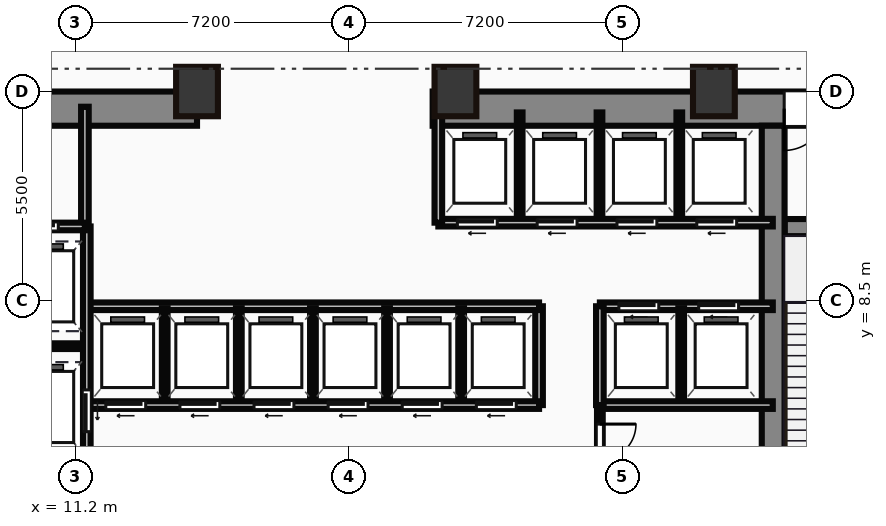
"""IFC4 building model, lengths in metres.
Left out: names, types, materials, properties, quantities, classifications, styles, units other than length and angle.
Written with IfcOpenShell. Run it as: python <this file> out.ifc"""

import sys

from ifc_helpers import new_model, si_unit, direction, frame, frame_2d, origin, origin_2d, place, context, subcontext, project, spatial, rectangle, hollow_rectangle, extrude, source, transform, mapped, element, fill, save


model = new_model("IFC4")
c1 = context("Model", 3, precision=1e-05, world=origin(), true_north=direction((0.0, 1.0)))
c2 = subcontext(c1, "Body", "Model", "MODEL_VIEW")
j1 = project(units=[si_unit("LENGTHUNIT", "METRE"), si_unit("PLANEANGLEUNIT", "RADIAN")], contexts=[c1])
p1 = place(None, origin())
s1 = spatial("IfcSite", under=j1, at=p1, CompositionType="ELEMENT")
p2 = place(p1, origin())
s2 = spatial("IfcBuilding", under=s1, at=p2, CompositionType="ELEMENT")
p3 = place(p2, origin())
s3 = spatial("IfcBuildingStorey", under=s2, at=p3, CompositionType="ELEMENT", Elevation=0.0)
m1 = source(origin(), c2, "Body", "SweptSolid", [
    extrude(rectangle(XDim=9.1, YDim=0.9, at=frame_2d((4.55, 0.0))), origin(), (0.0, 0.0, 1.0), 6.0),
])
p4 = place(p3, frame((5.3, 13.55, 0.0), z_axis=(0.0, 0.0, 1.0), x_axis=(1.0, 0.0, 0.0)))
e1 = element("IfcWall", 1, at=p4, inside=s3, PredefinedType="SHEAR", context=c2, shape_type="MappedRepresentation", body=[
    mapped(m1, transform((0.0, 0.0, 0.0))),
])
p5 = place(p4, frame((4.1, 0.0, 0.0)))
e2 = element("IfcOpeningElement", 2, at=p5, cuts=e1, PredefinedType="OPENING", context=c2, shape_type="SweptSolid", body=[
    extrude(rectangle(XDim=1.1, YDim=2.15, at=frame_2d((0.55, 1.075))), frame((0.0, 0.46, 0.0), z_axis=(0.0, -1.0, 0.0), x_axis=(1.0, 0.0, 0.0)), (0.0, 0.0, 1.0), 0.92),
])
m2 = source(origin(), c2, "Body", "SweptSolid", [
    extrude(rectangle(XDim=12.6, YDim=0.9, at=frame_2d((6.3, 0.0))), origin(), (0.0, 0.0, 1.0), 6.0),
])
p6 = place(p3, frame((20.6, 13.55, 0.0), z_axis=(0.0, 0.0, 1.0), x_axis=(1.0, 0.0, 0.0)))
e3 = element("IfcWall", 3, at=p6, inside=s3, PredefinedType="SHEAR", context=c2, shape_type="MappedRepresentation", body=[
    mapped(m2, transform((0.0, 0.0, 0.0))),
])
p7 = place(p6, frame((9.25, 0.0, 0.0)))
e4 = element("IfcOpeningElement", 4, at=p7, cuts=e3, PredefinedType="OPENING", context=c2, shape_type="SweptSolid", body=[
    extrude(rectangle(XDim=1.1, YDim=2.15, at=frame_2d((0.55, 1.075))), frame((0.0, 0.46, 0.0), z_axis=(0.0, -1.0, 0.0), x_axis=(1.0, 0.0, 0.0)), (0.0, 0.0, 1.0), 0.92),
])
m3 = source(origin(), c2, "Body", "SweptSolid", [
    extrude(rectangle(XDim=12.2, YDim=0.6, at=frame_2d((6.1, 0.0))), origin(), (0.0, 0.0, 1.0), 6.0),
])
p8 = place(p3, frame((29.56, 0.9, 0.0), z_axis=(0.0, 0.0, 1.0), x_axis=(0.0, 1.0, 0.0)))
e5 = element("IfcWall", 5, at=p8, inside=s3, PredefinedType="SHEAR", context=c2, shape_type="MappedRepresentation", body=[
    mapped(m3, transform((0.0, 0.0, 0.0))),
])
m4 = source(origin(), c2, "Body", "SweptSolid", [
    extrude(rectangle(XDim=3.39, YDim=0.45, at=frame_2d((1.695, 0.0))), origin(), (0.0, 0.0, 1.0), 6.0),
])
p9 = place(p3, frame((29.86, 10.42, 0.0), z_axis=(0.0, 0.0, 1.0), x_axis=(1.0, 0.0, 0.0)))
e6 = element("IfcWall", 6, at=p9, inside=s3, PredefinedType="SHEAR", context=c2, shape_type="MappedRepresentation", body=[
    mapped(m4, transform((0.0, 0.0, 0.0))),
])
p10 = place(p9, frame((1.1, 0.0, 0.0)))
e7 = element("IfcOpeningElement", 7, at=p10, cuts=e6, PredefinedType="OPENING", context=c2, shape_type="SweptSolid", body=[
    extrude(rectangle(XDim=1.1, YDim=2.15, at=frame_2d((0.55, 1.075))), frame((0.0, 0.235, 0.0), z_axis=(0.0, -1.0, 0.0), x_axis=(1.0, 0.0, 0.0)), (0.0, 0.0, 1.0), 0.47),
])
m5 = source(origin(), c2, "Body", "SweptSolid", [
    extrude(hollow_rectangle(XDim=1.1, YDim=1.3, WallThickness=0.055, at=origin_2d()), origin(), (0.0, 0.0, 1.0), 6.0),
])
for number, where, z_axis, x_axis in (
    (8, (14.4, 14.0, 0.0), (0.0, 0.0, 1.0), (1.0, 0.0, 0.0)),
    (9, (21.2, 14.0, 0.0), (0.0, 0.0, 1.0), (1.0, 0.0, 0.0)),
    (10, (28.0, 14.0, 0.0), (0.0, 0.0, 1.0), (1.0, 0.0, 0.0)),
):
    element("IfcColumn", number, at=place(p3, frame(where, z_axis=z_axis, x_axis=x_axis)), inside=s3, PredefinedType="PILASTER", context=c2, shape_type="MappedRepresentation", body=[
        mapped(m5, transform((0.0, 0.0, 0.0))),
    ])
m6 = source(origin(), c2, "Body", "SweptSolid", [
    extrude(rectangle(XDim=3.18, YDim=0.2, at=frame_2d((1.59, 0.0))), origin(), (0.0, 0.0, 1.0), 5.7),
])
p11 = place(p3, frame((11.45, 10.42, 0.0), z_axis=(0.0, 0.0, 1.0), x_axis=(0.0, 1.0, 0.0)))
e11 = element("IfcWall", 11, at=p11, inside=s3, PredefinedType="PARTITIONING", context=c2, shape_type="MappedRepresentation", body=[
    mapped(m6, transform((0.0, 0.0, 0.0))),
])
m7 = source(origin(), c2, "Body", "SweptSolid", [
    extrude(rectangle(XDim=2.35, YDim=0.2, at=frame_2d((1.175, 0.0))), origin(), (0.0, 0.0, 1.0), 5.7),
])
p12 = place(p3, frame((9.1, 10.45, 0.0), z_axis=(0.0, 0.0, 1.0), x_axis=(1.0, 0.0, 0.0)))
e12 = element("IfcWall", 12, at=p12, inside=s3, PredefinedType="PARTITIONING", context=c2, shape_type="MappedRepresentation", body=[
    mapped(m7, transform((0.0, 0.0, 0.0))),
])
p13 = place(p12, frame((0.55, 0.0, 0.0)))
e13 = element("IfcOpeningElement", 13, at=p13, cuts=e12, PredefinedType="OPENING", context=c2, shape_type="SweptSolid", body=[
    extrude(rectangle(XDim=1.1, YDim=2.15, at=frame_2d((0.55, 1.075))), frame((0.0, 0.11, 0.0), z_axis=(0.0, -1.0, 0.0), x_axis=(1.0, 0.0, 0.0)), (0.0, 0.0, 1.0), 0.22),
])
m8 = source(origin(), c2, "Body", "SweptSolid", [
    extrude(rectangle(XDim=9.6, YDim=0.2, at=frame_2d((4.8, 0.0))), origin(), (0.0, 0.0, 1.0), 5.7),
])
p14 = place(p3, frame((11.5, 0.85, 0.0), z_axis=(0.0, 0.0, 1.0), x_axis=(0.0, 1.0, 0.0)))
e14 = element("IfcWall", 14, at=p14, inside=s3, PredefinedType="PARTITIONING", context=c2, shape_type="MappedRepresentation", body=[
    mapped(m8, transform((0.0, 0.0, 0.0))),
])
p15 = place(p14, frame((4.2, 0.0, 0.0)))
e15 = element("IfcOpeningElement", 15, at=p15, cuts=e14, PredefinedType="OPENING", context=c2, shape_type="SweptSolid", body=[
    extrude(rectangle(XDim=1.1, YDim=2.15, at=frame_2d((0.55, 1.075))), frame((0.0, 0.11, 0.0), z_axis=(0.0, -1.0, 0.0), x_axis=(1.0, 0.0, 0.0)), (0.0, 0.0, 1.0), 0.22),
])
p16 = place(p14, frame((0.9, 0.0, 0.0)))
e16 = element("IfcOpeningElement", 16, at=p16, cuts=e14, PredefinedType="OPENING", context=c2, shape_type="SweptSolid", body=[
    extrude(rectangle(XDim=1.2, YDim=2.15, at=frame_2d((0.6, 1.075))), frame((0.0, 0.11, 0.0), z_axis=(0.0, -1.0, 0.0), x_axis=(1.0, 0.0, 0.0)), (0.0, 0.0, 1.0), 0.22),
])
m9 = source(origin(), c2, "Body", "SweptSolid", [
    extrude(rectangle(XDim=2.4, YDim=0.15, at=frame_2d((1.2, 0.0))), origin(), (0.0, 0.0, 1.0), 5.7),
])
p17 = place(p3, frame((9.1, 7.3, 0.0), z_axis=(0.0, 0.0, 1.0), x_axis=(1.0, 0.0, 0.0)))
e17 = element("IfcWall", 17, at=p17, inside=s3, PredefinedType="PARTITIONING", context=c2, shape_type="MappedRepresentation", body=[
    mapped(m9, transform((0.0, 0.0, 0.0))),
])
m10 = source(origin(), c2, "Body", "SweptSolid", [
    extrude(rectangle(XDim=11.85, YDim=0.2, at=frame_2d((5.925, 0.0))), origin(), (0.0, 0.0, 1.0), 5.7),
])
p18 = place(p3, frame((11.55, 5.75, 0.0), z_axis=(0.0, 0.0, 1.0), x_axis=(1.0, 0.0, 0.0)))
e18 = element("IfcWall", 18, at=p18, inside=s3, PredefinedType="PARTITIONING", context=c2, shape_type="MappedRepresentation", body=[
    mapped(m10, transform((0.0, 0.0, 0.0))),
])
p19 = place(p18, frame((0.45, 0.0, 0.0)))
e19 = element("IfcOpeningElement", 19, at=p19, cuts=e18, PredefinedType="OPENING", context=c2, shape_type="SweptSolid", body=[
    extrude(rectangle(XDim=1.05, YDim=2.15, at=frame_2d((0.525, 1.075))), frame((0.0, 0.11, 0.0), z_axis=(0.0, -1.0, 0.0), x_axis=(1.0, 0.0, 0.0)), (0.0, 0.0, 1.0), 0.22),
])
p20 = place(p18, frame((2.4, 0.0, 0.0)))
e20 = element("IfcOpeningElement", 20, at=p20, cuts=e18, PredefinedType="OPENING", context=c2, shape_type="SweptSolid", body=[
    extrude(rectangle(XDim=1.05, YDim=2.15, at=frame_2d((0.525, 1.075))), frame((0.0, 0.11, 0.0), z_axis=(0.0, -1.0, 0.0), x_axis=(1.0, 0.0, 0.0)), (0.0, 0.0, 1.0), 0.22),
])
p21 = place(p18, frame((4.35, 0.0, 0.0)))
e21 = element("IfcOpeningElement", 21, at=p21, cuts=e18, PredefinedType="OPENING", context=c2, shape_type="SweptSolid", body=[
    extrude(rectangle(XDim=1.05, YDim=2.15, at=frame_2d((0.525, 1.075))), frame((0.0, 0.11, 0.0), z_axis=(0.0, -1.0, 0.0), x_axis=(1.0, 0.0, 0.0)), (0.0, 0.0, 1.0), 0.22),
])
p22 = place(p18, frame((6.3, 0.0, 0.0)))
e22 = element("IfcOpeningElement", 22, at=p22, cuts=e18, PredefinedType="OPENING", context=c2, shape_type="SweptSolid", body=[
    extrude(rectangle(XDim=1.05, YDim=2.15, at=frame_2d((0.525, 1.075))), frame((0.0, 0.11, 0.0), z_axis=(0.0, -1.0, 0.0), x_axis=(1.0, 0.0, 0.0)), (0.0, 0.0, 1.0), 0.22),
])
p23 = place(p18, frame((8.25, 0.0, 0.0)))
e23 = element("IfcOpeningElement", 23, at=p23, cuts=e18, PredefinedType="OPENING", context=c2, shape_type="SweptSolid", body=[
    extrude(rectangle(XDim=1.05, YDim=2.15, at=frame_2d((0.525, 1.075))), frame((0.0, 0.11, 0.0), z_axis=(0.0, -1.0, 0.0), x_axis=(1.0, 0.0, 0.0)), (0.0, 0.0, 1.0), 0.22),
])
p24 = place(p18, frame((10.2, 0.0, 0.0)))
e24 = element("IfcOpeningElement", 24, at=p24, cuts=e18, PredefinedType="OPENING", context=c2, shape_type="SweptSolid", body=[
    extrude(rectangle(XDim=1.05, YDim=2.15, at=frame_2d((0.525, 1.075))), frame((0.0, 0.11, 0.0), z_axis=(0.0, -1.0, 0.0), x_axis=(1.0, 0.0, 0.0)), (0.0, 0.0, 1.0), 0.22),
])
p25 = place(p3, frame((11.55, 8.35, 0.0), z_axis=(0.0, 0.0, 1.0), x_axis=(1.0, 0.0, 0.0)))
e25 = element("IfcWall", 25, at=p25, inside=s3, PredefinedType="PARTITIONING", context=c2, shape_type="MappedRepresentation", body=[
    mapped(m10, transform((0.0, 0.0, 0.0))),
])
m11 = source(origin(), c2, "Body", "SweptSolid", [
    extrude(rectangle(XDim=2.6, YDim=0.2, at=frame_2d((1.3, 0.0))), origin(), (0.0, 0.0, 1.0), 5.7),
])
p26 = place(p3, frame((23.4, 5.75, 0.0), z_axis=(0.0, 0.0, 1.0), x_axis=(0.0, 1.0, 0.0)))
e26 = element("IfcWall", 26, at=p26, inside=s3, PredefinedType="PARTITIONING", context=c2, shape_type="MappedRepresentation", body=[
    mapped(m11, transform((0.0, 0.0, 0.0))),
])
m12 = source(origin(), c2, "Body", "SweptSolid", [
    extrude(rectangle(XDim=2.5, YDim=0.15, at=frame_2d((1.25, 0.0))), origin(), (0.0, 0.0, 1.0), 5.7),
])
for number, where, z_axis, x_axis in (
    (27, (13.55, 5.8, 0.0), (0.0, 0.0, 1.0), (0.0, 1.0, 0.0)),
    (28, (15.5, 5.8, 0.0), (0.0, 0.0, 1.0), (0.0, 1.0, 0.0)),
    (29, (17.45, 5.8, 0.0), (0.0, 0.0, 1.0), (0.0, 1.0, 0.0)),
    (30, (19.4, 5.8, 0.0), (0.0, 0.0, 1.0), (0.0, 1.0, 0.0)),
    (31, (21.35, 5.8, 0.0), (0.0, 0.0, 1.0), (0.0, 1.0, 0.0)),
):
    element("IfcWall", number, at=place(p3, frame(where, z_axis=z_axis, x_axis=x_axis)), inside=s3, PredefinedType="PARTITIONING", context=c2, shape_type="MappedRepresentation", body=[
        mapped(m12, transform((0.0, 0.0, 0.0))),
    ])
m13 = source(origin(), c2, "Body", "SweptSolid", [
    extrude(rectangle(XDim=8.8, YDim=0.2, at=frame_2d((4.4, 0.0))), origin(), (0.0, 0.0, 1.0), 5.7),
])
p27 = place(p3, frame((20.75, 10.55, 0.0), z_axis=(0.0, 0.0, 1.0), x_axis=(1.0, 0.0, 0.0)))
e32 = element("IfcWall", 32, at=p27, inside=s3, PredefinedType="PARTITIONING", context=c2, shape_type="MappedRepresentation", body=[
    mapped(m13, transform((0.0, 0.0, 0.0))),
])
p28 = place(p27, frame((0.5, 0.0, 0.0)))
e33 = element("IfcOpeningElement", 33, at=p28, cuts=e32, PredefinedType="OPENING", context=c2, shape_type="SweptSolid", body=[
    extrude(rectangle(XDim=1.05, YDim=2.15, at=frame_2d((0.525, 1.075))), frame((0.0, 0.11, 0.0), z_axis=(0.0, -1.0, 0.0), x_axis=(1.0, 0.0, 0.0)), (0.0, 0.0, 1.0), 0.22),
])
p29 = place(p27, frame((2.6, 0.0, 0.0)))
e34 = element("IfcOpeningElement", 34, at=p29, cuts=e32, PredefinedType="OPENING", context=c2, shape_type="SweptSolid", body=[
    extrude(rectangle(XDim=1.05, YDim=2.15, at=frame_2d((0.525, 1.075))), frame((0.0, 0.11, 0.0), z_axis=(0.0, -1.0, 0.0), x_axis=(1.0, 0.0, 0.0)), (0.0, 0.0, 1.0), 0.22),
])
p30 = place(p27, frame((4.7, 0.0, 0.0)))
e35 = element("IfcOpeningElement", 35, at=p30, cuts=e32, PredefinedType="OPENING", context=c2, shape_type="SweptSolid", body=[
    extrude(rectangle(XDim=1.05, YDim=2.15, at=frame_2d((0.525, 1.075))), frame((0.0, 0.11, 0.0), z_axis=(0.0, -1.0, 0.0), x_axis=(1.0, 0.0, 0.0)), (0.0, 0.0, 1.0), 0.22),
])
p31 = place(p27, frame((6.8, 0.0, 0.0)))
e36 = element("IfcOpeningElement", 36, at=p31, cuts=e32, PredefinedType="OPENING", context=c2, shape_type="SweptSolid", body=[
    extrude(rectangle(XDim=1.05, YDim=2.15, at=frame_2d((0.525, 1.075))), frame((0.0, 0.11, 0.0), z_axis=(0.0, -1.0, 0.0), x_axis=(1.0, 0.0, 0.0)), (0.0, 0.0, 1.0), 0.22),
])
m14 = source(origin(), c2, "Body", "SweptSolid", [
    extrude(rectangle(XDim=3.0, YDim=0.2, at=frame_2d((1.5, 0.0))), origin(), (0.0, 0.0, 1.0), 5.7),
])
p32 = place(p3, frame((20.75, 10.55, 0.0), z_axis=(0.0, 0.0, 1.0), x_axis=(0.0, 1.0, 0.0)))
e37 = element("IfcWall", 37, at=p32, inside=s3, PredefinedType="PARTITIONING", context=c2, shape_type="MappedRepresentation", body=[
    mapped(m14, transform((0.0, 0.0, 0.0))),
])
m15 = source(origin(), c2, "Body", "SweptSolid", [
    extrude(rectangle(XDim=2.85, YDim=0.15, at=frame_2d((1.425, 0.0))), origin(), (0.0, 0.0, 1.0), 5.7),
])
for number, where, z_axis, x_axis in (
    (38, (22.89, 10.6, 0.0), (0.0, 0.0, 1.0), (0.0, 1.0, 0.0)),
    (39, (24.99, 10.6, 0.0), (0.0, 0.0, 1.0), (0.0, 1.0, 0.0)),
    (40, (27.09, 10.6, 0.0), (0.0, 0.0, 1.0), (0.0, 1.0, 0.0)),
):
    element("IfcWall", number, at=place(p3, frame(where, z_axis=z_axis, x_axis=x_axis)), inside=s3, PredefinedType="PARTITIONING", context=c2, shape_type="MappedRepresentation", body=[
        mapped(m15, transform((0.0, 0.0, 0.0))),
    ])
m16 = source(origin(), c2, "Body", "SweptSolid", [
    extrude(rectangle(XDim=4.55, YDim=0.2, at=frame_2d((2.275, 0.0))), origin(), (0.0, 0.0, 1.0), 5.7),
])
p33 = place(p3, frame((25.0, 8.35, 0.0), z_axis=(0.0, 0.0, 1.0), x_axis=(1.0, 0.0, 0.0)))
e41 = element("IfcWall", 41, at=p33, inside=s3, PredefinedType="PARTITIONING", context=c2, shape_type="MappedRepresentation", body=[
    mapped(m16, transform((0.0, 0.0, 0.0))),
])
p34 = place(p33, frame((0.5, 0.0, 0.0)))
e42 = element("IfcOpeningElement", 42, at=p34, cuts=e41, PredefinedType="OPENING", context=c2, shape_type="SweptSolid", body=[
    extrude(rectangle(XDim=1.05, YDim=2.15, at=frame_2d((0.525, 1.075))), frame((0.0, 0.11, 0.0), z_axis=(0.0, -1.0, 0.0), x_axis=(1.0, 0.0, 0.0)), (0.0, 0.0, 1.0), 0.22),
])
p35 = place(p33, frame((2.6, 0.0, 0.0)))
e43 = element("IfcOpeningElement", 43, at=p35, cuts=e41, PredefinedType="OPENING", context=c2, shape_type="SweptSolid", body=[
    extrude(rectangle(XDim=1.05, YDim=2.15, at=frame_2d((0.525, 1.075))), frame((0.0, 0.11, 0.0), z_axis=(0.0, -1.0, 0.0), x_axis=(1.0, 0.0, 0.0)), (0.0, 0.0, 1.0), 0.22),
])
p36 = place(p3, frame((25.0, 5.75, 0.0), z_axis=(0.0, 0.0, 1.0), x_axis=(1.0, 0.0, 0.0)))
e44 = element("IfcWall", 44, at=p36, inside=s3, PredefinedType="PARTITIONING", context=c2, shape_type="MappedRepresentation", body=[
    mapped(m16, transform((0.0, 0.0, 0.0))),
])
p37 = place(p3, frame((25.0, 5.75, 0.0), z_axis=(0.0, 0.0, 1.0), x_axis=(0.0, 1.0, 0.0)))
e45 = element("IfcWall", 45, at=p37, inside=s3, PredefinedType="PARTITIONING", context=c2, shape_type="MappedRepresentation", body=[
    mapped(m11, transform((0.0, 0.0, 0.0))),
])
p38 = place(p3, frame((27.14, 5.8, 0.0), z_axis=(0.0, 0.0, 1.0), x_axis=(0.0, 1.0, 0.0)))
e46 = element("IfcWall", 46, at=p38, inside=s3, PredefinedType="PARTITIONING", context=c2, shape_type="MappedRepresentation", body=[
    mapped(m12, transform((0.0, 0.0, 0.0))),
])
m17 = source(origin(), c2, "Body", "SweptSolid", [
    extrude(rectangle(XDim=4.9, YDim=0.15, at=frame_2d((2.45, 0.0))), origin(), (0.0, 0.0, 1.0), 5.7),
])
p39 = place(p3, frame((25.0, 0.85, 0.0), z_axis=(0.0, 0.0, 1.0), x_axis=(0.0, 1.0, 0.0)))
e47 = element("IfcWall", 47, at=p39, inside=s3, PredefinedType="PARTITIONING", context=c2, shape_type="MappedRepresentation", body=[
    mapped(m17, transform((0.0, 0.0, 0.0))),
])
p40 = place(p39, frame((1.8, 0.0, 0.0)))
e48 = element("IfcOpeningElement", 48, at=p40, cuts=e47, PredefinedType="OPENING", context=c2, shape_type="SweptSolid", body=[
    extrude(rectangle(XDim=0.95, YDim=2.15, at=frame_2d((0.475, 1.075))), frame((0.0, 0.085, 0.0), z_axis=(0.0, -1.0, 0.0), x_axis=(1.0, 0.0, 0.0)), (0.0, 0.0, 1.0), 0.17),
])
p41 = place(p39, frame((3.45, 0.0, 0.0)))
e49 = element("IfcOpeningElement", 49, at=p41, cuts=e47, PredefinedType="OPENING", context=c2, shape_type="SweptSolid", body=[
    extrude(rectangle(XDim=0.95, YDim=2.15, at=frame_2d((0.475, 1.075))), frame((0.0, 0.085, 0.0), z_axis=(0.0, -1.0, 0.0), x_axis=(1.0, 0.0, 0.0)), (0.0, 0.0, 1.0), 0.17),
])
m18 = source(origin(), c2, "Body", "SweptSolid", [
    extrude(rectangle(XDim=1.1, YDim=2.15, at=frame_2d((0.55, 1.075))), frame((0.0, 0.025, 0.0), z_axis=(0.0, -1.0, 0.0), x_axis=(1.0, 0.0, 0.0)), (0.0, 0.0, 1.0), 0.05),
])
p42 = place(p7, origin())
e50 = element("IfcDoor", 50, at=p42, inside=s3, OperationType="SINGLE_SWING_LEFT", PredefinedType="DOOR", context=c2, shape_type="MappedRepresentation", body=[
    mapped(m18, transform((0.0, 0.0, 0.0))),
])
fill(e4, e50)
p43 = place(p13, origin())
e51 = element("IfcDoor", 51, at=p43, inside=s3, OperationType="SLIDING_TO_LEFT", PredefinedType="DOOR", context=c2, shape_type="MappedRepresentation", body=[
    mapped(m18, transform((0.0, 0.0, 0.0))),
])
fill(e13, e51)
p44 = place(p15, frame((1.1, 0.0, 0.0), z_axis=(0.0, 0.0, 1.0), x_axis=(-1.0, 0.0, 0.0)))
e52 = element("IfcDoor", 52, at=p44, inside=s3, OperationType="SLIDING_TO_LEFT", PredefinedType="DOOR", context=c2, shape_type="MappedRepresentation", body=[
    mapped(m18, transform((0.0, 0.0, 0.0))),
])
fill(e15, e52)
m19 = source(origin(), c2, "Body", "SweptSolid", [
    extrude(rectangle(XDim=1.05, YDim=2.15, at=frame_2d((0.525, 1.075))), frame((0.0, 0.025, 0.0), z_axis=(0.0, -1.0, 0.0), x_axis=(1.0, 0.0, 0.0)), (0.0, 0.0, 1.0), 0.05),
])
p45 = place(p19, frame((1.05, 0.0, 0.0), z_axis=(0.0, 0.0, 1.0), x_axis=(-1.0, 0.0, 0.0)))
e53 = element("IfcDoor", 53, at=p45, inside=s3, OperationType="SLIDING_TO_LEFT", PredefinedType="DOOR", context=c2, shape_type="MappedRepresentation", body=[
    mapped(m19, transform((0.0, 0.0, 0.0))),
])
fill(e19, e53)
p46 = place(p20, frame((1.05, 0.0, 0.0), z_axis=(0.0, 0.0, 1.0), x_axis=(-1.0, 0.0, 0.0)))
e54 = element("IfcDoor", 54, at=p46, inside=s3, OperationType="SLIDING_TO_LEFT", PredefinedType="DOOR", context=c2, shape_type="MappedRepresentation", body=[
    mapped(m19, transform((0.0, 0.0, 0.0))),
])
fill(e20, e54)
p47 = place(p21, frame((1.05, 0.0, 0.0), z_axis=(0.0, 0.0, 1.0), x_axis=(-1.0, 0.0, 0.0)))
e55 = element("IfcDoor", 55, at=p47, inside=s3, OperationType="SLIDING_TO_LEFT", PredefinedType="DOOR", context=c2, shape_type="MappedRepresentation", body=[
    mapped(m19, transform((0.0, 0.0, 0.0))),
])
fill(e21, e55)
p48 = place(p22, frame((1.05, 0.0, 0.0), z_axis=(0.0, 0.0, 1.0), x_axis=(-1.0, 0.0, 0.0)))
e56 = element("IfcDoor", 56, at=p48, inside=s3, OperationType="SLIDING_TO_LEFT", PredefinedType="DOOR", context=c2, shape_type="MappedRepresentation", body=[
    mapped(m19, transform((0.0, 0.0, 0.0))),
])
fill(e22, e56)
p49 = place(p23, frame((1.05, 0.0, 0.0), z_axis=(0.0, 0.0, 1.0), x_axis=(-1.0, 0.0, 0.0)))
e57 = element("IfcDoor", 57, at=p49, inside=s3, OperationType="SLIDING_TO_LEFT", PredefinedType="DOOR", context=c2, shape_type="MappedRepresentation", body=[
    mapped(m19, transform((0.0, 0.0, 0.0))),
])
fill(e23, e57)
p50 = place(p24, frame((1.05, 0.0, 0.0), z_axis=(0.0, 0.0, 1.0), x_axis=(-1.0, 0.0, 0.0)))
e58 = element("IfcDoor", 58, at=p50, inside=s3, OperationType="SLIDING_TO_LEFT", PredefinedType="DOOR", context=c2, shape_type="MappedRepresentation", body=[
    mapped(m19, transform((0.0, 0.0, 0.0))),
])
fill(e24, e58)
p51 = place(p28, frame((1.05, 0.0, 0.0), z_axis=(0.0, 0.0, 1.0), x_axis=(-1.0, 0.0, 0.0)))
e59 = element("IfcDoor", 59, at=p51, inside=s3, OperationType="SLIDING_TO_LEFT", PredefinedType="DOOR", context=c2, shape_type="MappedRepresentation", body=[
    mapped(m19, transform((0.0, 0.0, 0.0))),
])
fill(e33, e59)
p52 = place(p29, frame((1.05, 0.0, 0.0), z_axis=(0.0, 0.0, 1.0), x_axis=(-1.0, 0.0, 0.0)))
e60 = element("IfcDoor", 60, at=p52, inside=s3, OperationType="SLIDING_TO_LEFT", PredefinedType="DOOR", context=c2, shape_type="MappedRepresentation", body=[
    mapped(m19, transform((0.0, 0.0, 0.0))),
])
fill(e34, e60)
p53 = place(p30, frame((1.05, 0.0, 0.0), z_axis=(0.0, 0.0, 1.0), x_axis=(-1.0, 0.0, 0.0)))
e61 = element("IfcDoor", 61, at=p53, inside=s3, OperationType="SLIDING_TO_LEFT", PredefinedType="DOOR", context=c2, shape_type="MappedRepresentation", body=[
    mapped(m19, transform((0.0, 0.0, 0.0))),
])
fill(e35, e61)
p54 = place(p31, frame((1.05, 0.0, 0.0), z_axis=(0.0, 0.0, 1.0), x_axis=(-1.0, 0.0, 0.0)))
e62 = element("IfcDoor", 62, at=p54, inside=s3, OperationType="SLIDING_TO_LEFT", PredefinedType="DOOR", context=c2, shape_type="MappedRepresentation", body=[
    mapped(m19, transform((0.0, 0.0, 0.0))),
])
fill(e36, e62)
p55 = place(p34, origin())
e63 = element("IfcDoor", 63, at=p55, inside=s3, OperationType="SLIDING_TO_LEFT", PredefinedType="DOOR", context=c2, shape_type="MappedRepresentation", body=[
    mapped(m19, transform((0.0, 0.0, 0.0))),
])
fill(e42, e63)
p56 = place(p35, origin())
e64 = element("IfcDoor", 64, at=p56, inside=s3, OperationType="SLIDING_TO_LEFT", PredefinedType="DOOR", context=c2, shape_type="MappedRepresentation", body=[
    mapped(m19, transform((0.0, 0.0, 0.0))),
])
fill(e43, e64)
m20 = source(origin(), c2, "Body", "SweptSolid", [
    extrude(rectangle(XDim=0.95, YDim=2.15, at=frame_2d((0.475, 1.075))), frame((0.0, 0.025, 0.0), z_axis=(0.0, -1.0, 0.0), x_axis=(1.0, 0.0, 0.0)), (0.0, 0.0, 1.0), 0.05),
])
p57 = place(p41, origin())
e65 = element("IfcDoor", 65, at=p57, inside=s3, OperationType="SINGLE_SWING_RIGHT", PredefinedType="DOOR", context=c2, shape_type="MappedRepresentation", body=[
    mapped(m20, transform((0.0, 0.0, 0.0))),
])
fill(e49, e65)
save(model, sys.argv[1])
